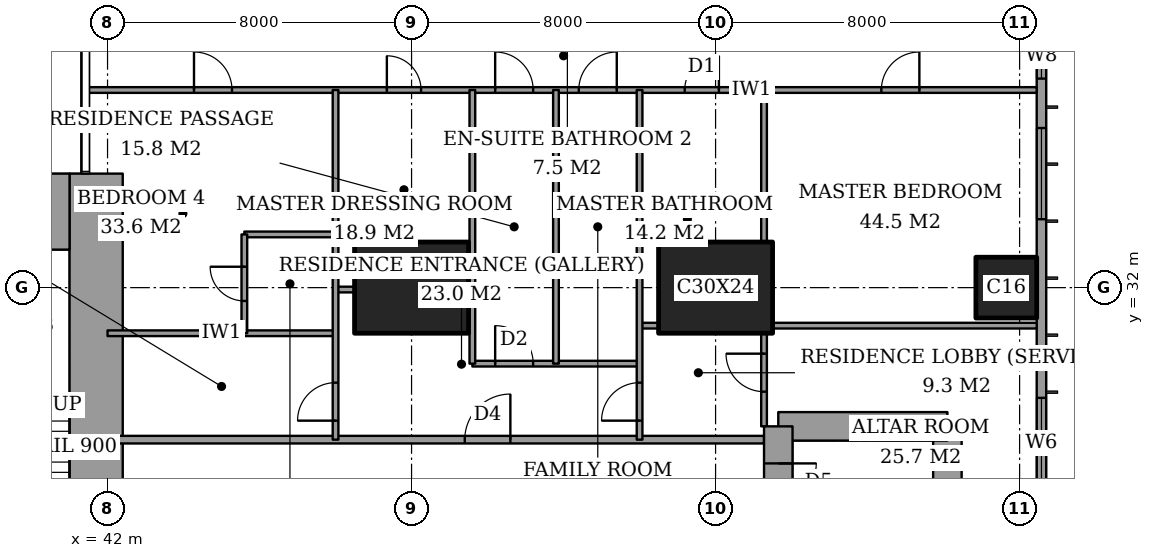
"""IFC4 building model, lengths in metres.
Left out: names, types, materials, properties, quantities, classifications, styles, units other than length and angle.
Written with IfcOpenShell. Run it as: python <this file> out.ifc"""

import sys

from ifc_helpers import new_model, si_unit, direction, frame, frame_2d, origin, origin_2d, place, context, subcontext, project, spatial, rectangle, extrude, element, fill, save


model = new_model("IFC4")
c1 = context("Model", 3, precision=1e-05, world=origin(), true_north=direction((0.0, 1.0)))
c2 = subcontext(c1, "Body", "Model", "MODEL_VIEW")
j1 = project(units=[si_unit("LENGTHUNIT", "METRE"), si_unit("PLANEANGLEUNIT", "RADIAN")], contexts=[c1])
p1 = place(None, origin())
s1 = spatial("IfcSite", under=j1, at=p1, CompositionType="ELEMENT")
p2 = place(p1, origin())
s2 = spatial("IfcBuilding", under=s1, at=p2, CompositionType="ELEMENT")
p3 = place(p2, frame((0.0, 0.0, 244.8)))
s3 = spatial("IfcBuildingStorey", under=s2, at=p3, CompositionType="ELEMENT", Elevation=244.8)
for number, where, z_axis, x_axis in (
    (1, (50.0, 32.0, 0.0), (0.0, 0.0, 1.0), (1.0, 0.0, 0.0)),
    (2, (58.0, 32.0, 0.0), (0.0, 0.0, 1.0), (1.0, 0.0, 0.0)),
):
    element("IfcColumn", number, at=place(p3, frame(where, z_axis=z_axis, x_axis=x_axis)), inside=s3, PredefinedType="COLUMN", context=c2, shape_type="SweptSolid", body=[
        extrude(rectangle(XDim=3.0, YDim=2.4, at=origin_2d()), origin(), (0.0, 0.0, 1.0), 3.6),
    ])
p4 = place(p3, frame((65.65, 32.0, 0.0), z_axis=(0.0, 0.0, 1.0), x_axis=(1.0, 0.0, 0.0)))
e3 = element("IfcColumn", 3, at=p4, inside=s3, PredefinedType="COLUMN", context=c2, shape_type="SweptSolid", body=[
    extrude(rectangle(XDim=1.6, YDim=1.6, at=origin_2d()), origin(), (0.0, 0.0, 1.0), 3.6),
])
p5 = place(p3, frame((37.85, 34.0, 0.0), z_axis=(0.0, 0.0, 1.0), x_axis=(1.0, 0.0, 0.0)))
e4 = element("IfcWall", 4, at=p5, inside=s3, PredefinedType="SHEAR", context=c2, shape_type="SweptSolid", body=[
    extrude(rectangle(XDim=3.15, YDim=2.0, at=frame_2d((1.575, 0.0))), origin(), (0.0, 0.0, 1.0), 3.6),
])
p6 = place(p3, frame((41.7, 24.85, 0.0), z_axis=(0.0, 0.0, 1.0), x_axis=(0.0, 1.0, 0.0)))
e5 = element("IfcWall", 5, at=p6, inside=s3, PredefinedType="SHEAR", context=c2, shape_type="SweptSolid", body=[
    extrude(rectangle(XDim=10.15, YDim=1.4, at=frame_2d((5.075, 0.0))), origin(), (0.0, 0.0, 1.0), 3.6),
])
p7 = place(p3, frame((64.1, 19.65, 0.0), z_axis=(0.0, 0.0, 1.0), x_axis=(0.0, 1.0, 0.0)))
e6 = element("IfcWall", 6, at=p7, inside=s3, PredefinedType="SHEAR", context=c2, shape_type="SweptSolid", body=[
    extrude(rectangle(XDim=8.7, YDim=0.75, at=frame_2d((4.35, 0.0))), origin(), (0.0, 0.0, 1.0), 3.6),
])
p8 = place(p3, frame((64.1, 28.35, 0.0), z_axis=(0.0, 0.0, 1.0), x_axis=(-1.0, 0.0, 0.0)))
e7 = element("IfcWall", 7, at=p8, inside=s3, PredefinedType="SHEAR", context=c2, shape_type="SweptSolid", body=[
    extrude(rectangle(XDim=4.45, YDim=0.75, at=frame_2d((2.225, 0.0))), origin(), (0.0, 0.0, 1.0), 3.6),
])
p9 = place(p3, frame((59.65, 28.35, 0.0), z_axis=(0.0, 0.0, 1.0), x_axis=(0.0, -1.0, 0.0)))
e8 = element("IfcWall", 8, at=p9, inside=s3, PredefinedType="SHEAR", context=c2, shape_type="SweptSolid", body=[
    extrude(rectangle(XDim=8.7, YDim=0.75, at=frame_2d((4.35, 0.0))), origin(), (0.0, 0.0, 1.0), 3.6),
])
p10 = place(p9, frame((0.975, 0.0, 0.0)))
e9 = element("IfcOpeningElement", 9, at=p10, cuts=e8, PredefinedType="OPENING", context=c2, shape_type="SweptSolid", body=[
    extrude(rectangle(XDim=1.0, YDim=2.1, at=frame_2d((0.5, 1.05))), frame((0.0, 0.385, 0.0), z_axis=(0.0, -1.0, 0.0), x_axis=(1.0, 0.0, 0.0)), (0.0, 0.0, 1.0), 0.77),
])
p11 = place(p3, frame((66.575, 3.175, 0.0), z_axis=(0.0, 0.0, 1.0), x_axis=(0.0, 1.0, 0.0)))
e10 = element("IfcWall", 10, at=p11, inside=s3, PredefinedType="SOLIDWALL", context=c2, shape_type="SweptSolid", body=[
    extrude(rectangle(XDim=41.65, YDim=0.25, at=frame_2d((20.825, 0.0))), origin(), (0.0, 0.0, 1.0), 3.6),
])
p12 = place(p11, frame((0.875, 0.0, 0.6)))
e11 = element("IfcOpeningElement", 11, at=p12, cuts=e10, PredefinedType="OPENING", context=c2, shape_type="SweptSolid", body=[
    extrude(rectangle(XDim=2.4, YDim=2.0, at=frame_2d((1.2, 1.0))), frame((0.0, 0.135, 0.0), z_axis=(0.0, -1.0, 0.0), x_axis=(1.0, 0.0, 0.0)), (0.0, 0.0, 1.0), 0.27),
])
p13 = place(p11, frame((6.0, 0.0, 0.6)))
e12 = element("IfcOpeningElement", 12, at=p13, cuts=e10, PredefinedType="OPENING", context=c2, shape_type="SweptSolid", body=[
    extrude(rectangle(XDim=1.2, YDim=2.0, at=frame_2d((0.6, 1.0))), frame((0.0, 0.135, 0.0), z_axis=(0.0, -1.0, 0.0), x_axis=(1.0, 0.0, 0.0)), (0.0, 0.0, 1.0), 0.27),
])
p14 = place(p11, frame((8.525, 0.0, 0.6)))
e13 = element("IfcOpeningElement", 13, at=p14, cuts=e10, PredefinedType="OPENING", context=c2, shape_type="SweptSolid", body=[
    extrude(rectangle(XDim=2.4, YDim=2.0, at=frame_2d((1.2, 1.0))), frame((0.0, 0.135, 0.0), z_axis=(0.0, -1.0, 0.0), x_axis=(1.0, 0.0, 0.0)), (0.0, 0.0, 1.0), 0.27),
])
p15 = place(p11, frame((15.725, 0.0, 0.6)))
e14 = element("IfcOpeningElement", 14, at=p15, cuts=e10, PredefinedType="OPENING", context=c2, shape_type="SweptSolid", body=[
    extrude(rectangle(XDim=2.4, YDim=2.0, at=frame_2d((1.2, 1.0))), frame((0.0, 0.135, 0.0), z_axis=(0.0, -1.0, 0.0), x_axis=(1.0, 0.0, 0.0)), (0.0, 0.0, 1.0), 0.27),
])
p16 = place(p11, frame((23.525, 0.0, 0.6)))
e15 = element("IfcOpeningElement", 15, at=p16, cuts=e10, PredefinedType="OPENING", context=c2, shape_type="SweptSolid", body=[
    extrude(rectangle(XDim=2.4, YDim=2.0, at=frame_2d((1.2, 1.0))), frame((0.0, 0.135, 0.0), z_axis=(0.0, -1.0, 0.0), x_axis=(1.0, 0.0, 0.0)), (0.0, 0.0, 1.0), 0.27),
])
p17 = place(p11, frame((30.625, 0.0, 0.6)))
e16 = element("IfcOpeningElement", 16, at=p17, cuts=e10, PredefinedType="OPENING", context=c2, shape_type="SweptSolid", body=[
    extrude(rectangle(XDim=2.4, YDim=2.0, at=frame_2d((1.2, 1.0))), frame((0.0, 0.135, 0.0), z_axis=(0.0, -1.0, 0.0), x_axis=(1.0, 0.0, 0.0)), (0.0, 0.0, 1.0), 0.27),
])
p18 = place(p11, frame((34.325, 0.0, 0.6)))
e17 = element("IfcOpeningElement", 17, at=p18, cuts=e10, PredefinedType="OPENING", context=c2, shape_type="SweptSolid", body=[
    extrude(rectangle(XDim=1.2, YDim=2.0, at=frame_2d((0.6, 1.0))), frame((0.0, 0.135, 0.0), z_axis=(0.0, -1.0, 0.0), x_axis=(1.0, 0.0, 0.0)), (0.0, 0.0, 1.0), 0.27),
])
p19 = place(p11, frame((38.375, 0.0, 0.6)))
e18 = element("IfcOpeningElement", 18, at=p19, cuts=e10, PredefinedType="OPENING", context=c2, shape_type="SweptSolid", body=[
    extrude(rectangle(XDim=2.4, YDim=2.0, at=frame_2d((1.2, 1.0))), frame((0.0, 0.135, 0.0), z_axis=(0.0, -1.0, 0.0), x_axis=(1.0, 0.0, 0.0)), (0.0, 0.0, 1.0), 0.27),
])
p20 = place(p3, frame((42.0, 28.0, 0.0), z_axis=(0.0, 0.0, 1.0), x_axis=(1.0, 0.0, 0.0)))
e19 = element("IfcWall", 19, at=p20, inside=s3, PredefinedType="PARTITIONING", context=c2, shape_type="SweptSolid", body=[
    extrude(rectangle(XDim=17.275, YDim=0.2, at=frame_2d((8.637, 0.0))), origin(), (0.0, 0.0, 1.0), 3.35),
])
p21 = place(p20, frame((9.4, 0.0, 0.0)))
e20 = element("IfcOpeningElement", 20, at=p21, cuts=e19, PredefinedType="OPENING", context=c2, shape_type="SweptSolid", body=[
    extrude(rectangle(XDim=1.2, YDim=2.4, at=frame_2d((0.6, 1.2))), frame((0.0, 0.11, 0.0), z_axis=(0.0, -1.0, 0.0), x_axis=(1.0, 0.0, 0.0)), (0.0, 0.0, 1.0), 0.22),
])
p22 = place(p3, frame((51.6, 30.0, 0.0), z_axis=(0.0, 0.0, 1.0), x_axis=(1.0, 0.0, 0.0)))
e21 = element("IfcWall", 21, at=p22, inside=s3, PredefinedType="PARTITIONING", context=c2, shape_type="SweptSolid", body=[
    extrude(rectangle(XDim=4.4, YDim=0.15, at=frame_2d((2.2, 0.0))), origin(), (0.0, 0.0, 1.0), 3.35),
])
p23 = place(p22, frame((0.6, 0.0, 0.0)))
e22 = element("IfcOpeningElement", 22, at=p23, cuts=e21, PredefinedType="OPENING", context=c2, shape_type="SweptSolid", body=[
    extrude(rectangle(XDim=1.0, YDim=2.1, at=frame_2d((0.5, 1.05))), frame((0.0, 0.085, 0.0), z_axis=(0.0, -1.0, 0.0), x_axis=(1.0, 0.0, 0.0)), (0.0, 0.0, 1.0), 0.17),
])
p24 = place(p3, frame((42.0, 30.8, 0.0), z_axis=(0.0, 0.0, 1.0), x_axis=(1.0, 0.0, 0.0)))
e23 = element("IfcWall", 23, at=p24, inside=s3, PredefinedType="PARTITIONING", context=c2, shape_type="SweptSolid", body=[
    extrude(rectangle(XDim=6.0, YDim=0.15, at=frame_2d((3.0, 0.0))), origin(), (0.0, 0.0, 1.0), 3.35),
])
p25 = place(p3, frame((56.0, 31.0, 0.0), z_axis=(0.0, 0.0, 1.0), x_axis=(1.0, 0.0, 0.0)))
e24 = element("IfcWall", 24, at=p25, inside=s3, PredefinedType="PARTITIONING", context=c2, shape_type="SweptSolid", body=[
    extrude(rectangle(XDim=0.5, YDim=0.15, at=frame_2d((0.25, 0.0))), origin(), (0.0, 0.0, 1.0), 3.35),
])
p26 = place(p3, frame((59.5, 31.0, 0.0), z_axis=(0.0, 0.0, 1.0), x_axis=(1.0, 0.0, 0.0)))
e25 = element("IfcWall", 25, at=p26, inside=s3, PredefinedType="PARTITIONING", context=c2, shape_type="SweptSolid", body=[
    extrude(rectangle(XDim=6.95, YDim=0.15, at=frame_2d((3.475, 0.0))), origin(), (0.0, 0.0, 1.0), 3.35),
])
p27 = place(p3, frame((48.0, 31.95, 0.0), z_axis=(0.0, 0.0, 1.0), x_axis=(1.0, 0.0, 0.0)))
e26 = element("IfcWall", 26, at=p27, inside=s3, PredefinedType="PARTITIONING", context=c2, shape_type="SweptSolid", body=[
    extrude(rectangle(XDim=0.5, YDim=0.15, at=frame_2d((0.25, 0.0))), origin(), (0.0, 0.0, 1.0), 2.634),
])
p28 = place(p3, frame((45.6, 33.4, 0.0), z_axis=(0.0, 0.0, 1.0), x_axis=(1.0, 0.0, 0.0)))
e27 = element("IfcWall", 27, at=p28, inside=s3, PredefinedType="PARTITIONING", context=c2, shape_type="SweptSolid", body=[
    extrude(rectangle(XDim=2.4, YDim=0.15, at=frame_2d((1.2, 0.0))), origin(), (0.0, 0.0, 1.0), 3.35),
])
p29 = place(p3, frame((41.439, 37.2, 0.0), z_axis=(0.0, 0.0, 1.0), x_axis=(1.0, 0.0, 0.0)))
e28 = element("IfcWall", 28, at=p29, inside=s3, PredefinedType="PARTITIONING", context=c2, shape_type="SweptSolid", body=[
    extrude(rectangle(XDim=25.011, YDim=0.15, at=frame_2d((12.505, 0.0))), origin(), (0.0, 0.0, 1.0), 3.35),
])
p30 = place(p29, frame((10.761, 0.0, 0.0)))
e29 = element("IfcOpeningElement", 29, at=p30, cuts=e28, PredefinedType="OPENING", context=c2, shape_type="SweptSolid", body=[
    extrude(rectangle(XDim=1.0, YDim=2.1, at=frame_2d((0.5, 1.05))), frame((0.0, 0.085, 0.0), z_axis=(0.0, -1.0, 0.0), x_axis=(1.0, 0.0, 0.0)), (0.0, 0.0, 1.0), 0.17),
])
p31 = place(p29, frame((20.924, 0.0, 0.0)))
e30 = element("IfcOpeningElement", 30, at=p31, cuts=e28, PredefinedType="OPENING", context=c2, shape_type="SweptSolid", body=[
    extrude(rectangle(XDim=1.0, YDim=2.1, at=frame_2d((0.5, 1.05))), frame((0.0, 0.085, 0.0), z_axis=(0.0, -1.0, 0.0), x_axis=(1.0, 0.0, 0.0)), (0.0, 0.0, 1.0), 0.17),
])
p32 = place(p29, frame((15.749, 0.0, 0.0)))
e31 = element("IfcOpeningElement", 31, at=p32, cuts=e28, PredefinedType="OPENING", context=c2, shape_type="SweptSolid", body=[
    extrude(rectangle(XDim=0.9, YDim=2.1, at=frame_2d((0.45, 1.05))), frame((0.0, 0.085, 0.0), z_axis=(0.0, -1.0, 0.0), x_axis=(1.0, 0.0, 0.0)), (0.0, 0.0, 1.0), 0.17),
])
p33 = place(p29, frame((12.961, 0.0, 0.0)))
e32 = element("IfcOpeningElement", 32, at=p33, cuts=e28, PredefinedType="OPENING", context=c2, shape_type="SweptSolid", body=[
    extrude(rectangle(XDim=1.0, YDim=2.1, at=frame_2d((0.5, 1.05))), frame((0.0, 0.085, 0.0), z_axis=(0.0, -1.0, 0.0), x_axis=(1.0, 0.0, 0.0)), (0.0, 0.0, 1.0), 0.17),
])
p34 = place(p29, frame((7.911, 0.0, 0.0)))
e33 = element("IfcOpeningElement", 33, at=p34, cuts=e28, PredefinedType="OPENING", context=c2, shape_type="SweptSolid", body=[
    extrude(rectangle(XDim=0.9, YDim=2.1, at=frame_2d((0.45, 1.05))), frame((0.0, 0.085, 0.0), z_axis=(0.0, -1.0, 0.0), x_axis=(1.0, 0.0, 0.0)), (0.0, 0.0, 1.0), 0.17),
])
p35 = place(p29, frame((2.836, 0.0, 0.0)))
e34 = element("IfcOpeningElement", 34, at=p35, cuts=e28, PredefinedType="OPENING", context=c2, shape_type="SweptSolid", body=[
    extrude(rectangle(XDim=1.0, YDim=2.1, at=frame_2d((0.5, 1.05))), frame((0.0, 0.085, 0.0), z_axis=(0.0, -1.0, 0.0), x_axis=(1.0, 0.0, 0.0)), (0.0, 0.0, 1.0), 0.17),
])
p36 = place(p3, frame((45.6, 30.8, 0.0), z_axis=(0.0, 0.0, 1.0), x_axis=(0.0, 1.0, 0.0)))
e35 = element("IfcWall", 35, at=p36, inside=s3, PredefinedType="PARTITIONING", context=c2, shape_type="SweptSolid", body=[
    extrude(rectangle(XDim=2.6, YDim=0.15, at=frame_2d((1.3, 0.0))), origin(), (0.0, 0.0, 1.0), 3.35),
])
p37 = place(p36, frame((0.85, 0.0, 0.0)))
e36 = element("IfcOpeningElement", 36, at=p37, cuts=e35, PredefinedType="OPENING", context=c2, shape_type="SweptSolid", body=[
    extrude(rectangle(XDim=0.9, YDim=2.1, at=frame_2d((0.45, 1.05))), frame((0.0, 0.085, 0.0), z_axis=(0.0, -1.0, 0.0), x_axis=(1.0, 0.0, 0.0)), (0.0, 0.0, 1.0), 0.17),
])
p38 = place(p3, frame((48.0, 28.0, 0.0), z_axis=(0.0, 0.0, 1.0), x_axis=(0.0, 1.0, 0.0)))
e37 = element("IfcWall", 37, at=p38, inside=s3, PredefinedType="PARTITIONING", context=c2, shape_type="SweptSolid", body=[
    extrude(rectangle(XDim=9.2, YDim=0.15, at=frame_2d((4.6, 0.0))), origin(), (0.0, 0.0, 1.0), 3.35),
])
p39 = place(p38, frame((0.5, 0.0, 0.0)))
e38 = element("IfcOpeningElement", 38, at=p39, cuts=e37, PredefinedType="OPENING", context=c2, shape_type="SweptSolid", body=[
    extrude(rectangle(XDim=1.0, YDim=2.1, at=frame_2d((0.5, 1.05))), frame((0.0, 0.085, 0.0), z_axis=(0.0, -1.0, 0.0), x_axis=(1.0, 0.0, 0.0)), (0.0, 0.0, 1.0), 0.17),
])
for number, where, z_axis, x_axis in (
    (39, (51.6, 30.0, 0.0), (0.0, 0.0, 1.0), (0.0, 1.0, 0.0)),
    (40, (53.8, 30.0, 0.0), (0.0, 0.0, 1.0), (0.0, 1.0, 0.0)),
):
    element("IfcWall", number, at=place(p3, frame(where, z_axis=z_axis, x_axis=x_axis)), inside=s3, PredefinedType="PARTITIONING", context=c2, shape_type="SweptSolid", body=[
        extrude(rectangle(XDim=7.2, YDim=0.15, at=frame_2d((3.6, 0.0))), origin(), (0.0, 0.0, 1.0), 3.35),
    ])
p40 = place(p3, frame((56.0, 28.0, 0.0), z_axis=(0.0, 0.0, 1.0), x_axis=(0.0, 1.0, 0.0)))
e41 = element("IfcWall", 41, at=p40, inside=s3, PredefinedType="PARTITIONING", context=c2, shape_type="SweptSolid", body=[
    extrude(rectangle(XDim=9.2, YDim=0.15, at=frame_2d((4.6, 0.0))), origin(), (0.0, 0.0, 1.0), 3.35),
])
p41 = place(p40, frame((0.5, 0.0, 0.0)))
e42 = element("IfcOpeningElement", 42, at=p41, cuts=e41, PredefinedType="OPENING", context=c2, shape_type="SweptSolid", body=[
    extrude(rectangle(XDim=1.0, YDim=2.1, at=frame_2d((0.5, 1.05))), frame((0.0, 0.085, 0.0), z_axis=(0.0, -1.0, 0.0), x_axis=(1.0, 0.0, 0.0)), (0.0, 0.0, 1.0), 0.17),
])
p42 = place(p3, frame((59.275, 28.35, 0.0), z_axis=(0.0, 0.0, 1.0), x_axis=(0.0, 1.0, 0.0)))
e43 = element("IfcWall", 43, at=p42, inside=s3, PredefinedType="PARTITIONING", context=c2, shape_type="SweptSolid", body=[
    extrude(rectangle(XDim=2.45, YDim=0.15, at=frame_2d((1.225, 0.0))), origin(), (0.0, 0.0, 1.0), 3.35),
])
p43 = place(p42, frame((0.913, 0.0, 0.0)))
e44 = element("IfcOpeningElement", 44, at=p43, cuts=e43, PredefinedType="OPENING", context=c2, shape_type="SweptSolid", body=[
    extrude(rectangle(XDim=1.0, YDim=2.1, at=frame_2d((0.5, 1.05))), frame((0.0, 0.085, 0.0), z_axis=(0.0, -1.0, 0.0), x_axis=(1.0, 0.0, 0.0)), (0.0, 0.0, 1.0), 0.17),
])
p44 = place(p3, frame((59.275, 33.2, 0.0), z_axis=(0.0, 0.0, 1.0), x_axis=(0.0, 1.0, 0.0)))
e45 = element("IfcWall", 45, at=p44, inside=s3, PredefinedType="PARTITIONING", context=c2, shape_type="SweptSolid", body=[
    extrude(rectangle(XDim=4.0, YDim=0.15, at=frame_2d((2.0, 0.0))), origin(), (0.0, 0.0, 1.0), 3.35),
])
p45 = place(p16, origin())
e46 = element("IfcWindow", 46, at=p45, inside=s3, PartitioningType="SINGLE_PANEL", PredefinedType="WINDOW", context=c2, shape_type="SweptSolid", body=[
    extrude(rectangle(XDim=2.4, YDim=2.0, at=frame_2d((1.2, 1.0))), frame((0.0, 0.03, 0.0), z_axis=(0.0, -1.0, 0.0), x_axis=(1.0, 0.0, 0.0)), (0.0, 0.0, 1.0), 0.06),
])
fill(e15, e46)
p46 = place(p17, origin())
e47 = element("IfcWindow", 47, at=p46, inside=s3, PartitioningType="SINGLE_PANEL", PredefinedType="WINDOW", context=c2, shape_type="SweptSolid", body=[
    extrude(rectangle(XDim=2.4, YDim=2.0, at=frame_2d((1.2, 1.0))), frame((0.0, 0.03, 0.0), z_axis=(0.0, -1.0, 0.0), x_axis=(1.0, 0.0, 0.0)), (0.0, 0.0, 1.0), 0.06),
])
fill(e16, e47)
p47 = place(p18, origin())
e48 = element("IfcWindow", 48, at=p47, inside=s3, PartitioningType="SINGLE_PANEL", PredefinedType="WINDOW", context=c2, shape_type="SweptSolid", body=[
    extrude(rectangle(XDim=1.2, YDim=2.0, at=frame_2d((0.6, 1.0))), frame((0.0, 0.03, 0.0), z_axis=(0.0, -1.0, 0.0), x_axis=(1.0, 0.0, 0.0)), (0.0, 0.0, 1.0), 0.06),
])
fill(e17, e48)
p48 = place(p30, origin())
e49 = element("IfcDoor", 49, at=p48, inside=s3, OperationType="SINGLE_SWING_RIGHT", PredefinedType="DOOR", context=c2, shape_type="SweptSolid", body=[
    extrude(rectangle(XDim=1.0, YDim=2.1, at=frame_2d((0.5, 1.05))), frame((0.0, 0.025, 0.0), z_axis=(0.0, -1.0, 0.0), x_axis=(1.0, 0.0, 0.0)), (0.0, 0.0, 1.0), 0.05),
])
fill(e29, e49)
p49 = place(p31, origin())
e50 = element("IfcDoor", 50, at=p49, inside=s3, OperationType="SINGLE_SWING_LEFT", PredefinedType="DOOR", context=c2, shape_type="SweptSolid", body=[
    extrude(rectangle(XDim=1.0, YDim=2.1, at=frame_2d((0.5, 1.05))), frame((0.0, 0.025, 0.0), z_axis=(0.0, -1.0, 0.0), x_axis=(1.0, 0.0, 0.0)), (0.0, 0.0, 1.0), 0.05),
])
fill(e30, e50)
p50 = place(p43, origin())
e51 = element("IfcDoor", 51, at=p50, inside=s3, OperationType="SINGLE_SWING_LEFT", PredefinedType="DOOR", context=c2, shape_type="SweptSolid", body=[
    extrude(rectangle(XDim=1.0, YDim=2.1, at=frame_2d((0.5, 1.05))), frame((0.0, 0.025, 0.0), z_axis=(0.0, -1.0, 0.0), x_axis=(1.0, 0.0, 0.0)), (0.0, 0.0, 1.0), 0.05),
])
fill(e44, e51)
p51 = place(p32, origin())
e52 = element("IfcDoor", 52, at=p51, inside=s3, OperationType="SINGLE_SWING_LEFT", PredefinedType="DOOR", context=c2, shape_type="SweptSolid", body=[
    extrude(rectangle(XDim=0.9, YDim=2.1, at=frame_2d((0.45, 1.05))), frame((0.0, 0.025, 0.0), z_axis=(0.0, -1.0, 0.0), x_axis=(1.0, 0.0, 0.0)), (0.0, 0.0, 1.0), 0.05),
])
fill(e31, e52)
p52 = place(p41, origin())
e53 = element("IfcDoor", 53, at=p52, inside=s3, OperationType="SINGLE_SWING_RIGHT", PredefinedType="DOOR", context=c2, shape_type="SweptSolid", body=[
    extrude(rectangle(XDim=1.0, YDim=2.1, at=frame_2d((0.5, 1.05))), frame((0.0, 0.025, 0.0), z_axis=(0.0, -1.0, 0.0), x_axis=(1.0, 0.0, 0.0)), (0.0, 0.0, 1.0), 0.05),
])
fill(e42, e53)
p53 = place(p21, origin())
e54 = element("IfcDoor", 54, at=p53, inside=s3, OperationType="SINGLE_SWING_LEFT", PredefinedType="DOOR", context=c2, shape_type="SweptSolid", body=[
    extrude(rectangle(XDim=1.2, YDim=2.4, at=frame_2d((0.6, 1.2))), frame((0.0, 0.025, 0.0), z_axis=(0.0, -1.0, 0.0), x_axis=(1.0, 0.0, 0.0)), (0.0, 0.0, 1.0), 0.05),
])
fill(e20, e54)
p54 = place(p33, origin())
e55 = element("IfcDoor", 55, at=p54, inside=s3, OperationType="SINGLE_SWING_LEFT", PredefinedType="DOOR", context=c2, shape_type="SweptSolid", body=[
    extrude(rectangle(XDim=1.0, YDim=2.1, at=frame_2d((0.5, 1.05))), frame((0.0, 0.025, 0.0), z_axis=(0.0, -1.0, 0.0), x_axis=(1.0, 0.0, 0.0)), (0.0, 0.0, 1.0), 0.05),
])
fill(e32, e55)
p55 = place(p23, origin())
e56 = element("IfcDoor", 56, at=p55, inside=s3, OperationType="SINGLE_SWING_RIGHT", PredefinedType="DOOR", context=c2, shape_type="SweptSolid", body=[
    extrude(rectangle(XDim=1.0, YDim=2.1, at=frame_2d((0.5, 1.05))), frame((0.0, 0.025, 0.0), z_axis=(0.0, -1.0, 0.0), x_axis=(1.0, 0.0, 0.0)), (0.0, 0.0, 1.0), 0.05),
])
fill(e22, e56)
p56 = place(p34, origin())
e57 = element("IfcDoor", 57, at=p56, inside=s3, OperationType="SINGLE_SWING_RIGHT", PredefinedType="DOOR", context=c2, shape_type="SweptSolid", body=[
    extrude(rectangle(XDim=0.9, YDim=2.1, at=frame_2d((0.45, 1.05))), frame((0.0, 0.025, 0.0), z_axis=(0.0, -1.0, 0.0), x_axis=(1.0, 0.0, 0.0)), (0.0, 0.0, 1.0), 0.05),
])
fill(e33, e57)
p57 = place(p37, origin())
e58 = element("IfcDoor", 58, at=p57, inside=s3, OperationType="SINGLE_SWING_LEFT", PredefinedType="DOOR", context=c2, shape_type="SweptSolid", body=[
    extrude(rectangle(XDim=0.9, YDim=2.1, at=frame_2d((0.45, 1.05))), frame((0.0, 0.025, 0.0), z_axis=(0.0, -1.0, 0.0), x_axis=(1.0, 0.0, 0.0)), (0.0, 0.0, 1.0), 0.05),
])
fill(e36, e58)
p58 = place(p35, origin())
e59 = element("IfcDoor", 59, at=p58, inside=s3, OperationType="SINGLE_SWING_RIGHT", PredefinedType="DOOR", context=c2, shape_type="SweptSolid", body=[
    extrude(rectangle(XDim=1.0, YDim=2.1, at=frame_2d((0.5, 1.05))), frame((0.0, 0.025, 0.0), z_axis=(0.0, -1.0, 0.0), x_axis=(1.0, 0.0, 0.0)), (0.0, 0.0, 1.0), 0.05),
])
fill(e34, e59)
p59 = place(p39, origin())
e60 = element("IfcDoor", 60, at=p59, inside=s3, OperationType="SINGLE_SWING_RIGHT", PredefinedType="DOOR", context=c2, shape_type="SweptSolid", body=[
    extrude(rectangle(XDim=1.0, YDim=2.1, at=frame_2d((0.5, 1.05))), frame((0.0, 0.025, 0.0), z_axis=(0.0, -1.0, 0.0), x_axis=(1.0, 0.0, 0.0)), (0.0, 0.0, 1.0), 0.05),
])
fill(e38, e60)
p60 = place(p10, origin())
e61 = element("IfcDoor", 61, at=p60, inside=s3, OperationType="SINGLE_SWING_RIGHT", PredefinedType="DOOR", context=c2, shape_type="SweptSolid", body=[
    extrude(rectangle(XDim=1.0, YDim=2.1, at=frame_2d((0.5, 1.05))), frame((0.0, 0.025, 0.0), z_axis=(0.0, -1.0, 0.0), x_axis=(1.0, 0.0, 0.0)), (0.0, 0.0, 1.0), 0.05),
])
fill(e9, e61)
save(model, sys.argv[1])
